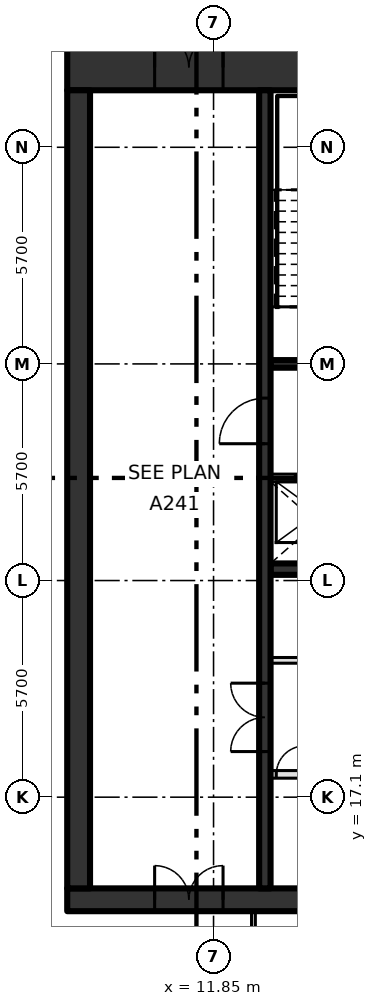
"""IFC4 building model, lengths in metres.
Left out: names, types, materials, properties, quantities, classifications, styles, units other than length and angle.
Written with IfcOpenShell. Run it as: python <this file> out.ifc"""

import sys

from ifc_helpers import new_model, si_unit, direction, frame, frame_2d, origin, place, context, subcontext, project, spatial, rectangle, extrude, element, fill, save


model = new_model("IFC4")
c1 = context("Model", 3, precision=1e-05, world=origin(), true_north=direction((0.0, 1.0)))
c2 = subcontext(c1, "Body", "Model", "MODEL_VIEW")
j1 = project(units=[si_unit("LENGTHUNIT", "METRE"), si_unit("PLANEANGLEUNIT", "RADIAN")], contexts=[c1])
p1 = place(None, origin())
s1 = spatial("IfcSite", under=j1, at=p1, CompositionType="ELEMENT")
p2 = place(p1, origin())
s2 = spatial("IfcBuilding", under=s1, at=p2, CompositionType="ELEMENT")
p3 = place(p2, frame((0.0, 0.0, 302.4)))
s3 = spatial("IfcBuildingStorey", under=s2, at=p3, CompositionType="ELEMENT", Elevation=302.4)
p4 = place(p3, frame((8.0, 14.4, -0.3), z_axis=(0.0, 0.0, 1.0), x_axis=(1.0, 0.0, 0.0)))
e1 = element("IfcWall", 1, at=p4, inside=s3, PredefinedType="SHEAR", context=c2, shape_type="SweptSolid", body=[
    extrude(rectangle(XDim=22.8, YDim=0.6, at=frame_2d((11.4, 0.0))), origin(), (0.0, 0.0, 1.0), 4.2),
])
p5 = place(p4, frame((2.3, 0.0, 0.3)))
e2 = element("IfcOpeningElement", 2, at=p5, cuts=e1, PredefinedType="OPENING", context=c2, shape_type="SweptSolid", body=[
    extrude(rectangle(XDim=1.8, YDim=2.1, at=frame_2d((0.9, 1.05))), frame((0.0, 0.31, 0.0), z_axis=(0.0, -1.0, 0.0), x_axis=(1.0, 0.0, 0.0)), (0.0, 0.0, 1.0), 0.62),
])
p6 = place(p3, frame((8.0, 36.3, -0.3), z_axis=(0.0, 0.0, 1.0), x_axis=(1.0, 0.0, 0.0)))
e3 = element("IfcWall", 3, at=p6, inside=s3, PredefinedType="SHEAR", context=c2, shape_type="SweptSolid", body=[
    extrude(rectangle(XDim=22.8, YDim=1.2, at=frame_2d((11.4, 0.0))), origin(), (0.0, 0.0, 1.0), 4.2),
])
p7 = place(p6, frame((2.3, 0.0, 0.3)))
e4 = element("IfcOpeningElement", 4, at=p7, cuts=e3, PredefinedType="OPENING", context=c2, shape_type="SweptSolid", body=[
    extrude(rectangle(XDim=1.8, YDim=2.1, at=frame_2d((0.9, 1.05))), frame((0.0, 0.61, 0.0), z_axis=(0.0, -1.0, 0.0), x_axis=(1.0, 0.0, 0.0)), (0.0, 0.0, 1.0), 1.22),
])
p8 = place(p3, frame((8.3, 14.7, -0.3), z_axis=(0.0, 0.0, 1.0), x_axis=(0.0, 1.0, 0.0)))
e5 = element("IfcWall", 5, at=p8, inside=s3, PredefinedType="SHEAR", context=c2, shape_type="SweptSolid", body=[
    extrude(rectangle(XDim=21.0, YDim=0.6, at=frame_2d((10.5, 0.0))), origin(), (0.0, 0.0, 1.0), 4.2),
])
p9 = place(p3, frame((13.35, 17.7, 0.0), z_axis=(0.0, 0.0, 1.0), x_axis=(1.0, 0.0, 0.0)))
e6 = element("IfcWall", 6, at=p9, inside=s3, PredefinedType="SOLIDWALL", context=c2, shape_type="SweptSolid", body=[
    extrude(rectangle(XDim=13.425, YDim=0.2, at=frame_2d((6.712, 0.0))), origin(), (0.0, 0.0, 1.0), 3.9),
])
p10 = place(p9, frame((2.0, 0.0, 0.0)))
e7 = element("IfcOpeningElement", 7, at=p10, cuts=e6, PredefinedType="OPENING", context=c2, shape_type="SweptSolid", body=[
    extrude(rectangle(XDim=1.1, YDim=2.1, at=frame_2d((0.55, 1.05))), frame((0.0, 0.11, 0.0), z_axis=(0.0, -1.0, 0.0), x_axis=(1.0, 0.0, 0.0)), (0.0, 0.0, 1.0), 0.22),
])
p11 = place(p9, frame((4.7, 0.0, 0.0)))
e8 = element("IfcOpeningElement", 8, at=p11, cuts=e6, PredefinedType="OPENING", context=c2, shape_type="SweptSolid", body=[
    extrude(rectangle(XDim=1.1, YDim=2.1, at=frame_2d((0.55, 1.05))), frame((0.0, 0.11, 0.0), z_axis=(0.0, -1.0, 0.0), x_axis=(1.0, 0.0, 0.0)), (0.0, 0.0, 1.0), 0.22),
])
p12 = place(p9, frame((7.4, 0.0, 0.0)))
e9 = element("IfcOpeningElement", 9, at=p12, cuts=e6, PredefinedType="OPENING", context=c2, shape_type="SweptSolid", body=[
    extrude(rectangle(XDim=1.1, YDim=2.1, at=frame_2d((0.55, 1.05))), frame((0.0, 0.11, 0.0), z_axis=(0.0, -1.0, 0.0), x_axis=(1.0, 0.0, 0.0)), (0.0, 0.0, 1.0), 0.22),
])
p13 = place(p9, frame((10.1, 0.0, 0.0)))
e10 = element("IfcOpeningElement", 10, at=p13, cuts=e6, PredefinedType="OPENING", context=c2, shape_type="SweptSolid", body=[
    extrude(rectangle(XDim=1.1, YDim=2.1, at=frame_2d((0.55, 1.05))), frame((0.0, 0.11, 0.0), z_axis=(0.0, -1.0, 0.0), x_axis=(1.0, 0.0, 0.0)), (0.0, 0.0, 1.0), 0.22),
])
p14 = place(p9, frame((0.15, 0.0, 0.0)))
e11 = element("IfcOpeningElement", 11, at=p14, cuts=e6, PredefinedType="OPENING", context=c2, shape_type="SweptSolid", body=[
    extrude(rectangle(XDim=0.75, YDim=2.1, at=frame_2d((0.375, 1.05))), frame((0.0, 0.11, 0.0), z_axis=(0.0, -1.0, 0.0), x_axis=(1.0, 0.0, 0.0)), (0.0, 0.0, 1.0), 0.22),
])
p15 = place(p9, frame((12.3, 0.0, 0.0)))
e12 = element("IfcOpeningElement", 12, at=p15, cuts=e6, PredefinedType="OPENING", context=c2, shape_type="SweptSolid", body=[
    extrude(rectangle(XDim=0.75, YDim=2.1, at=frame_2d((0.375, 1.05))), frame((0.0, 0.11, 0.0), z_axis=(0.0, -1.0, 0.0), x_axis=(1.0, 0.0, 0.0)), (0.0, 0.0, 1.0), 0.22),
])
p16 = place(p3, frame((13.35, 20.7, 0.0), z_axis=(0.0, 0.0, 1.0), x_axis=(1.0, 0.0, 0.0)))
e13 = element("IfcWall", 13, at=p16, inside=s3, PredefinedType="PARTITIONING", context=c2, shape_type="SweptSolid", body=[
    extrude(rectangle(XDim=13.425, YDim=0.15, at=frame_2d((6.712, 0.0))), origin(), (0.0, 0.0, 1.0), 3.9),
])
p17 = place(p16, frame((0.75, 0.0, 0.0)))
e14 = element("IfcOpeningElement", 14, at=p17, cuts=e13, PredefinedType="OPENING", context=c2, shape_type="SweptSolid", body=[
    extrude(rectangle(XDim=0.9, YDim=2.1, at=frame_2d((0.45, 1.05))), frame((0.0, 0.085, 0.0), z_axis=(0.0, -1.0, 0.0), x_axis=(1.0, 0.0, 0.0)), (0.0, 0.0, 1.0), 0.17),
])
p18 = place(p16, frame((7.5, 0.0, 0.0)))
e15 = element("IfcOpeningElement", 15, at=p18, cuts=e13, PredefinedType="OPENING", context=c2, shape_type="SweptSolid", body=[
    extrude(rectangle(XDim=0.9, YDim=2.1, at=frame_2d((0.45, 1.05))), frame((0.0, 0.085, 0.0), z_axis=(0.0, -1.0, 0.0), x_axis=(1.0, 0.0, 0.0)), (0.0, 0.0, 1.0), 0.17),
])
p19 = place(p3, frame((13.35, 23.1, 0.0), z_axis=(0.0, 0.0, 1.0), x_axis=(1.0, 0.0, 0.0)))
e16 = element("IfcWall", 16, at=p19, inside=s3, PredefinedType="SHEAR", context=c2, shape_type="SweptSolid", body=[
    extrude(rectangle(XDim=16.85, YDim=0.3, at=frame_2d((8.425, 0.0))), origin(), (0.0, 0.0, 1.0), 3.9),
])
p20 = place(p3, frame((13.35, 25.5, 0.0), z_axis=(0.0, 0.0, 1.0), x_axis=(1.0, 0.0, 0.0)))
e17 = element("IfcWall", 17, at=p20, inside=s3, PredefinedType="SOLIDWALL", context=c2, shape_type="SweptSolid", body=[
    extrude(rectangle(XDim=16.85, YDim=0.2, at=frame_2d((8.425, 0.0))), origin(), (0.0, 0.0, 1.0), 3.9),
])
p21 = place(p20, frame((0.65, 0.0, 0.0)))
e18 = element("IfcOpeningElement", 18, at=p21, cuts=e17, PredefinedType="OPENING", context=c2, shape_type="SweptSolid", body=[
    extrude(rectangle(XDim=1.1, YDim=2.1, at=frame_2d((0.55, 1.05))), frame((0.0, 0.11, 0.0), z_axis=(0.0, -1.0, 0.0), x_axis=(1.0, 0.0, 0.0)), (0.0, 0.0, 1.0), 0.22),
])
p22 = place(p20, frame((3.35, 0.0, 0.0)))
e19 = element("IfcOpeningElement", 19, at=p22, cuts=e17, PredefinedType="OPENING", context=c2, shape_type="SweptSolid", body=[
    extrude(rectangle(XDim=1.1, YDim=2.1, at=frame_2d((0.55, 1.05))), frame((0.0, 0.11, 0.0), z_axis=(0.0, -1.0, 0.0), x_axis=(1.0, 0.0, 0.0)), (0.0, 0.0, 1.0), 0.22),
])
p23 = place(p20, frame((6.05, 0.0, 0.0)))
e20 = element("IfcOpeningElement", 20, at=p23, cuts=e17, PredefinedType="OPENING", context=c2, shape_type="SweptSolid", body=[
    extrude(rectangle(XDim=1.1, YDim=2.1, at=frame_2d((0.55, 1.05))), frame((0.0, 0.11, 0.0), z_axis=(0.0, -1.0, 0.0), x_axis=(1.0, 0.0, 0.0)), (0.0, 0.0, 1.0), 0.22),
])
p24 = place(p20, frame((8.75, 0.0, 0.0)))
e21 = element("IfcOpeningElement", 21, at=p24, cuts=e17, PredefinedType="OPENING", context=c2, shape_type="SweptSolid", body=[
    extrude(rectangle(XDim=1.1, YDim=2.1, at=frame_2d((0.55, 1.05))), frame((0.0, 0.11, 0.0), z_axis=(0.0, -1.0, 0.0), x_axis=(1.0, 0.0, 0.0)), (0.0, 0.0, 1.0), 0.22),
])
p25 = place(p20, frame((13.0, 0.0, 0.0)))
e22 = element("IfcOpeningElement", 22, at=p25, cuts=e17, PredefinedType="OPENING", context=c2, shape_type="SweptSolid", body=[
    extrude(rectangle(XDim=0.9, YDim=2.1, at=frame_2d((0.45, 1.05))), frame((0.0, 0.11, 0.0), z_axis=(0.0, -1.0, 0.0), x_axis=(1.0, 0.0, 0.0)), (0.0, 0.0, 1.0), 0.22),
])
p26 = place(p3, frame((13.35, 28.5, 0.0), z_axis=(0.0, 0.0, 1.0), x_axis=(1.0, 0.0, 0.0)))
e23 = element("IfcWall", 23, at=p26, inside=s3, PredefinedType="SOLIDWALL", context=c2, shape_type="SweptSolid", body=[
    extrude(rectangle(XDim=6.75, YDim=0.2, at=frame_2d((3.375, 0.0))), origin(), (0.0, 0.0, 1.0), 3.9),
])
p27 = place(p26, frame((0.95, 0.0, 0.0)))
e24 = element("IfcOpeningElement", 24, at=p27, cuts=e23, PredefinedType="OPENING", context=c2, shape_type="SweptSolid", body=[
    extrude(rectangle(XDim=1.2, YDim=2.1, at=frame_2d((0.6, 1.05))), frame((0.0, 0.11, 0.0), z_axis=(0.0, -1.0, 0.0), x_axis=(1.0, 0.0, 0.0)), (0.0, 0.0, 1.0), 0.22),
])
p28 = place(p26, frame((3.75, 0.0, 0.0)))
e25 = element("IfcOpeningElement", 25, at=p28, cuts=e23, PredefinedType="OPENING", context=c2, shape_type="SweptSolid", body=[
    extrude(rectangle(XDim=1.1, YDim=2.1, at=frame_2d((0.55, 1.05))), frame((0.0, 0.11, 0.0), z_axis=(0.0, -1.0, 0.0), x_axis=(1.0, 0.0, 0.0)), (0.0, 0.0, 1.0), 0.22),
])
p29 = place(p3, frame((13.2, 14.7, 0.0), z_axis=(0.0, 0.0, 1.0), x_axis=(0.0, 1.0, 0.0)))
e26 = element("IfcWall", 26, at=p29, inside=s3, PredefinedType="SHEAR", context=c2, shape_type="SweptSolid", body=[
    extrude(rectangle(XDim=21.0, YDim=0.3, at=frame_2d((10.5, 0.0))), origin(), (0.0, 0.0, 1.0), 3.9),
])
p30 = place(p29, frame((3.6, 0.0, 0.0)))
e27 = element("IfcOpeningElement", 27, at=p30, cuts=e26, PredefinedType="OPENING", context=c2, shape_type="SweptSolid", body=[
    extrude(rectangle(XDim=1.8, YDim=2.1, at=frame_2d((0.9, 1.05))), frame((0.0, 0.16, 0.0), z_axis=(0.0, -1.0, 0.0), x_axis=(1.0, 0.0, 0.0)), (0.0, 0.0, 1.0), 0.32),
])
p31 = place(p29, frame((11.7, 0.0, 0.0)))
e28 = element("IfcOpeningElement", 28, at=p31, cuts=e26, PredefinedType="OPENING", context=c2, shape_type="SweptSolid", body=[
    extrude(rectangle(XDim=1.2, YDim=2.1, at=frame_2d((0.6, 1.05))), frame((0.0, 0.16, 0.0), z_axis=(0.0, -1.0, 0.0), x_axis=(1.0, 0.0, 0.0)), (0.0, 0.0, 1.0), 0.32),
])
p32 = place(p3, frame((12.9, 10.078, 0.0), z_axis=(0.0, 0.0, 1.0), x_axis=(0.0, 1.0, 0.0)))
e29 = element("IfcWall", 29, at=p32, inside=s3, PredefinedType="PARTITIONING", context=c2, shape_type="SweptSolid", body=[
    extrude(rectangle(XDim=4.022, YDim=0.1, at=frame_2d((2.011, 0.0))), origin(), (0.0, 0.0, 1.0), 3.9),
])
p33 = place(p21, origin())
e30 = element("IfcDoor", 30, at=p33, inside=s3, OperationType="SLIDING_TO_LEFT", PredefinedType="DOOR", context=c2, shape_type="SweptSolid", body=[
    extrude(rectangle(XDim=1.1, YDim=2.1, at=frame_2d((0.55, 1.05))), frame((0.0, 0.025, 0.0), z_axis=(0.0, -1.0, 0.0), x_axis=(1.0, 0.0, 0.0)), (0.0, 0.0, 1.0), 0.05),
])
fill(e18, e30)
p34 = place(p14, origin())
e31 = element("IfcDoor", 31, at=p34, inside=s3, OperationType="SINGLE_SWING_RIGHT", PredefinedType="DOOR", context=c2, shape_type="SweptSolid", body=[
    extrude(rectangle(XDim=0.75, YDim=2.1, at=frame_2d((0.375, 1.05))), frame((0.0, 0.025, 0.0), z_axis=(0.0, -1.0, 0.0), x_axis=(1.0, 0.0, 0.0)), (0.0, 0.0, 1.0), 0.05),
])
fill(e11, e31)
p35 = place(p30, origin())
e32 = element("IfcDoor", 32, at=p35, inside=s3, OperationType="DOUBLE_DOOR_SINGLE_SWING", PredefinedType="DOOR", context=c2, shape_type="SweptSolid", body=[
    extrude(rectangle(XDim=1.8, YDim=2.1, at=frame_2d((0.9, 1.05))), frame((0.0, 0.025, 0.0), z_axis=(0.0, -1.0, 0.0), x_axis=(1.0, 0.0, 0.0)), (0.0, 0.0, 1.0), 0.05),
])
fill(e27, e32)
p36 = place(p31, origin())
e33 = element("IfcDoor", 33, at=p36, inside=s3, OperationType="SINGLE_SWING_LEFT", PredefinedType="DOOR", context=c2, shape_type="SweptSolid", body=[
    extrude(rectangle(XDim=1.2, YDim=2.1, at=frame_2d((0.6, 1.05))), frame((0.0, 0.025, 0.0), z_axis=(0.0, -1.0, 0.0), x_axis=(1.0, 0.0, 0.0)), (0.0, 0.0, 1.0), 0.05),
])
fill(e28, e33)
p37 = place(p7, origin())
e34 = element("IfcDoor", 34, at=p37, inside=s3, OperationType="DOUBLE_DOOR_SINGLE_SWING", PredefinedType="DOOR", context=c2, shape_type="SweptSolid", body=[
    extrude(rectangle(XDim=1.8, YDim=2.1, at=frame_2d((0.9, 1.05))), frame((0.0, 0.025, 0.0), z_axis=(0.0, -1.0, 0.0), x_axis=(1.0, 0.0, 0.0)), (0.0, 0.0, 1.0), 0.05),
])
fill(e4, e34)
p38 = place(p5, origin())
e35 = element("IfcDoor", 35, at=p38, inside=s3, OperationType="DOUBLE_DOOR_SINGLE_SWING", PredefinedType="DOOR", context=c2, shape_type="SweptSolid", body=[
    extrude(rectangle(XDim=1.8, YDim=2.1, at=frame_2d((0.9, 1.05))), frame((0.0, 0.025, 0.0), z_axis=(0.0, -1.0, 0.0), x_axis=(1.0, 0.0, 0.0)), (0.0, 0.0, 1.0), 0.05),
])
fill(e2, e35)
save(model, sys.argv[1])
